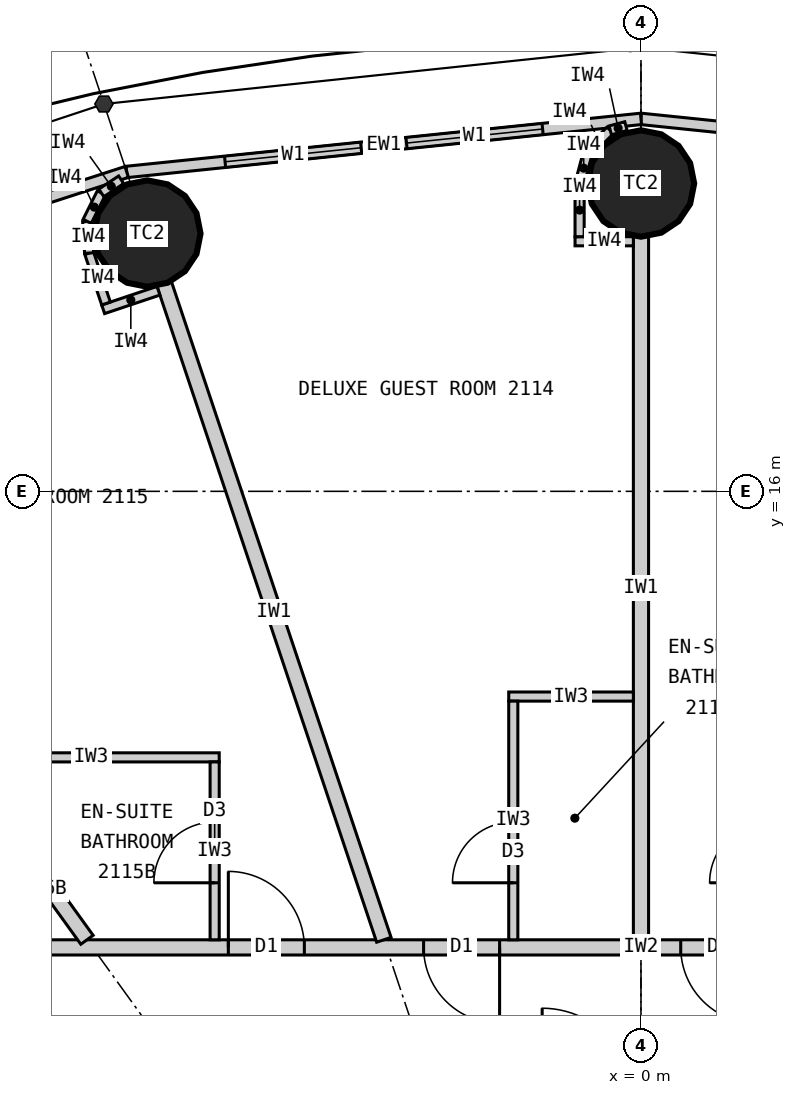
"""IFC4 building model, lengths in metres.
Left out: names, types, materials, properties, quantities, classifications, styles, units other than length and angle.
Written with IfcOpenShell. Run it as: python <this file> out.ifc"""

import sys

from ifc_helpers import new_model, si_unit, direction, frame, frame_2d, origin, origin_2d, place, context, subcontext, project, spatial, rectangle, circle, extrude, element, fill, save


model = new_model("IFC4")
c1 = context("Model", 3, precision=1e-05, world=origin(), true_north=direction((0.0, 1.0)))
c2 = subcontext(c1, "Body", "Model", "MODEL_VIEW")
j1 = project(units=[si_unit("LENGTHUNIT", "METRE"), si_unit("PLANEANGLEUNIT", "RADIAN")], contexts=[c1])
p1 = place(None, origin())
s1 = spatial("IfcSite", under=j1, at=p1, CompositionType="ELEMENT")
p2 = place(p1, origin())
s2 = spatial("IfcBuilding", under=s1, at=p2, CompositionType="ELEMENT")
p3 = place(p2, frame((0.0, 0.0, 83.7)))
s3 = spatial("IfcBuildingStorey", under=s2, at=p3, CompositionType="ELEMENT", Elevation=83.7)
for number, where, z_axis, x_axis in (
    (1, (0.0, 20.05, 0.0), (0.0, 0.0, 1.0), (1.0, 0.0, 0.0)),
    (2, (-6.495, 19.391, 0.0), (0.0, 0.0, 1.0), (1.0, 0.0, 0.0)),
):
    element("IfcColumn", number, at=place(p3, frame(where, z_axis=z_axis, x_axis=x_axis)), inside=s3, PredefinedType="COLUMN", context=c2, shape_type="SweptSolid", body=[
        extrude(circle(Radius=0.7, at=origin_2d()), origin(), (0.0, 0.0, 1.0), 3.3),
    ])
p4 = place(p3, frame((6.766, 20.202, 0.0), z_axis=(0.0, 0.0, 1.0), x_axis=(-0.994721394369, 0.102612609291, 0.0)))
e3 = element("IfcWall", 3, at=p4, inside=s3, PredefinedType="ELEMENTEDWALL", context=c2, shape_type="SweptSolid", body=[
    extrude(rectangle(XDim=6.802, YDim=0.15, at=frame_2d((3.401, 0.0))), origin(), (0.0, 0.0, 1.0), 3.12),
])
p5 = place(p4, frame((1.301, 0.0, 0.9)))
e4 = element("IfcOpeningElement", 4, at=p5, cuts=e3, PredefinedType="OPENING", context=c2, shape_type="SweptSolid", body=[
    extrude(rectangle(XDim=1.8, YDim=1.9, at=frame_2d((0.9, 0.95))), frame((0.0, 0.085, 0.0), z_axis=(0.0, -1.0, 0.0), x_axis=(1.0, 0.0, 0.0)), (0.0, 0.0, 1.0), 0.17),
])
p6 = place(p4, frame((3.701, 0.0, 0.9)))
e5 = element("IfcOpeningElement", 5, at=p6, cuts=e3, PredefinedType="OPENING", context=c2, shape_type="SweptSolid", body=[
    extrude(rectangle(XDim=1.8, YDim=1.9, at=frame_2d((0.9, 0.95))), frame((0.0, 0.085, 0.0), z_axis=(0.0, -1.0, 0.0), x_axis=(1.0, 0.0, 0.0)), (0.0, 0.0, 1.0), 0.17),
])
p7 = place(p3, frame((0.0, 20.9, 0.0), z_axis=(0.0, 0.0, 1.0), x_axis=(-0.994721394369, -0.102612609291, 0.0)))
e6 = element("IfcWall", 6, at=p7, inside=s3, PredefinedType="ELEMENTEDWALL", context=c2, shape_type="SweptSolid", body=[
    extrude(rectangle(XDim=6.802, YDim=0.15, at=frame_2d((3.401, 0.0))), origin(), (0.0, 0.0, 1.0), 3.12),
])
p8 = place(p7, frame((1.301, 0.0, 0.9)))
e7 = element("IfcOpeningElement", 7, at=p8, cuts=e6, PredefinedType="OPENING", context=c2, shape_type="SweptSolid", body=[
    extrude(rectangle(XDim=1.8, YDim=1.9, at=frame_2d((0.9, 0.95))), frame((0.0, 0.085, 0.0), z_axis=(0.0, -1.0, 0.0), x_axis=(1.0, 0.0, 0.0)), (0.0, 0.0, 1.0), 0.17),
])
p9 = place(p7, frame((3.701, 0.0, 0.9)))
e8 = element("IfcOpeningElement", 8, at=p9, cuts=e6, PredefinedType="OPENING", context=c2, shape_type="SweptSolid", body=[
    extrude(rectangle(XDim=1.8, YDim=1.9, at=frame_2d((0.9, 0.95))), frame((0.0, 0.085, 0.0), z_axis=(0.0, -1.0, 0.0), x_axis=(1.0, 0.0, 0.0)), (0.0, 0.0, 1.0), 0.17),
])
p10 = place(p3, frame((-6.766, 20.202, 0.0), z_axis=(0.0, 0.0, 1.0), x_axis=(-0.951137534625, -0.308767534285, 0.0)))
e9 = element("IfcWall", 9, at=p10, inside=s3, PredefinedType="ELEMENTEDWALL", context=c2, shape_type="SweptSolid", body=[
    extrude(rectangle(XDim=6.655, YDim=0.15, at=frame_2d((3.328, 0.0))), origin(), (0.0, 0.0, 1.0), 3.12),
])
p11 = place(p10, frame((1.228, 0.0, 0.9)))
e10 = element("IfcOpeningElement", 10, at=p11, cuts=e9, PredefinedType="OPENING", context=c2, shape_type="SweptSolid", body=[
    extrude(rectangle(XDim=1.8, YDim=1.9, at=frame_2d((0.9, 0.95))), frame((0.0, 0.085, 0.0), z_axis=(0.0, -1.0, 0.0), x_axis=(1.0, 0.0, 0.0)), (0.0, 0.0, 1.0), 0.17),
])
p12 = place(p10, frame((3.628, 0.0, 0.9)))
e11 = element("IfcOpeningElement", 11, at=p12, cuts=e9, PredefinedType="OPENING", context=c2, shape_type="SweptSolid", body=[
    extrude(rectangle(XDim=1.8, YDim=1.9, at=frame_2d((0.9, 0.95))), frame((0.0, 0.085, 0.0), z_axis=(0.0, -1.0, 0.0), x_axis=(1.0, 0.0, 0.0)), (0.0, 0.0, 1.0), 0.17),
])
p13 = place(p3, frame((-14.1, 10.0, 0.0), z_axis=(0.0, 0.0, 1.0), x_axis=(1.0, 0.0, 0.0)))
e12 = element("IfcWall", 12, at=p13, inside=s3, PredefinedType="PARTITIONING", context=c2, shape_type="SweptSolid", body=[
    extrude(rectangle(XDim=28.2, YDim=0.2, at=frame_2d((14.1, 0.0))), origin(), (0.0, 0.0, 1.0), 3.12),
])
p14 = place(p13, frame((23.865, 0.0, 0.0)))
e13 = element("IfcOpeningElement", 13, at=p14, cuts=e12, PredefinedType="OPENING", context=c2, shape_type="SweptSolid", body=[
    extrude(rectangle(XDim=1.0, YDim=2.2, at=frame_2d((0.5, 1.1))), frame((0.0, 0.11, 0.0), z_axis=(0.0, -1.0, 0.0), x_axis=(1.0, 0.0, 0.0)), (0.0, 0.0, 1.0), 0.22),
])
p15 = place(p13, frame((18.529, 0.0, 0.0)))
e14 = element("IfcOpeningElement", 14, at=p15, cuts=e12, PredefinedType="OPENING", context=c2, shape_type="SweptSolid", body=[
    extrude(rectangle(XDim=1.0, YDim=2.2, at=frame_2d((0.5, 1.1))), frame((0.0, 0.11, 0.0), z_axis=(0.0, -1.0, 0.0), x_axis=(1.0, 0.0, 0.0)), (0.0, 0.0, 1.0), 0.22),
])
p16 = place(p13, frame((14.623, 0.0, 0.0)))
e15 = element("IfcOpeningElement", 15, at=p16, cuts=e12, PredefinedType="OPENING", context=c2, shape_type="SweptSolid", body=[
    extrude(rectangle(XDim=1.0, YDim=2.2, at=frame_2d((0.5, 1.1))), frame((0.0, 0.11, 0.0), z_axis=(0.0, -1.0, 0.0), x_axis=(1.0, 0.0, 0.0)), (0.0, 0.0, 1.0), 0.22),
])
p17 = place(p13, frame((11.24, 0.0, 0.0)))
e16 = element("IfcOpeningElement", 16, at=p17, cuts=e12, PredefinedType="OPENING", context=c2, shape_type="SweptSolid", body=[
    extrude(rectangle(XDim=1.0, YDim=2.2, at=frame_2d((0.5, 1.1))), frame((0.0, 0.11, 0.0), z_axis=(0.0, -1.0, 0.0), x_axis=(1.0, 0.0, 0.0)), (0.0, 0.0, 1.0), 0.22),
])
p18 = place(p13, frame((8.671, 0.0, 0.0)))
e17 = element("IfcOpeningElement", 17, at=p18, cuts=e12, PredefinedType="OPENING", context=c2, shape_type="SweptSolid", body=[
    extrude(rectangle(XDim=1.0, YDim=2.2, at=frame_2d((0.5, 1.1))), frame((0.0, 0.11, 0.0), z_axis=(0.0, -1.0, 0.0), x_axis=(1.0, 0.0, 0.0)), (0.0, 0.0, 1.0), 0.22),
])
p19 = place(p13, frame((2.801, 0.0, 0.0)))
e18 = element("IfcOpeningElement", 18, at=p19, cuts=e12, PredefinedType="OPENING", context=c2, shape_type="SweptSolid", body=[
    extrude(rectangle(XDim=1.0, YDim=2.2, at=frame_2d((0.5, 1.1))), frame((0.0, 0.11, 0.0), z_axis=(0.0, -1.0, 0.0), x_axis=(1.0, 0.0, 0.0)), (0.0, 0.0, 1.0), 0.22),
])
p20 = place(p3, frame((0.0, 10.1, 0.0), z_axis=(0.0, 0.0, 1.0), x_axis=(0.0, 1.0, 0.0)))
e19 = element("IfcWall", 19, at=p20, inside=s3, PredefinedType="PARTITIONING", context=c2, shape_type="SweptSolid", body=[
    extrude(rectangle(XDim=9.25, YDim=0.2, at=frame_2d((4.625, 0.0))), origin(), (0.0, 0.0, 1.0), 2.32),
])
p21 = place(p3, frame((-3.383, 10.1, 0.0), z_axis=(0.0, 0.0, 1.0), x_axis=(-0.31759592231, 0.948226149256, 0.0)))
e20 = element("IfcWall", 20, at=p21, inside=s3, PredefinedType="PARTITIONING", context=c2, shape_type="SweptSolid", body=[
    extrude(rectangle(XDim=9.098, YDim=0.2, at=frame_2d((4.549, 0.0))), origin(), (0.0, 0.0, 1.0), 2.32),
])
p22 = place(p3, frame((-7.289, 10.1, 0.0), z_axis=(0.0, 0.0, 1.0), x_axis=(-0.585198353053, 0.810890182197, 0.0)))
e21 = element("IfcWall", 21, at=p22, inside=s3, PredefinedType="PARTITIONING", context=c2, shape_type="SweptSolid", body=[
    extrude(rectangle(XDim=8.36, YDim=0.2, at=frame_2d((4.18, 0.0))), origin(), (0.0, 0.0, 1.0), 2.32),
])
p23 = place(p3, frame((-0.1, 13.3, 0.0), z_axis=(0.0, 0.0, 1.0), x_axis=(-1.0, 0.0, 0.0)))
e22 = element("IfcWall", 22, at=p23, inside=s3, PredefinedType="PARTITIONING", context=c2, shape_type="SweptSolid", body=[
    extrude(rectangle(XDim=1.64, YDim=0.12, at=frame_2d((0.82, 0.0))), origin(), (0.0, 0.0, 1.0), 3.12),
])
p24 = place(p3, frame((-1.68, 10.1, 0.0), z_axis=(0.0, 0.0, 1.0), x_axis=(0.0, 1.0, 0.0)))
e23 = element("IfcWall", 23, at=p24, inside=s3, PredefinedType="PARTITIONING", context=c2, shape_type="SweptSolid", body=[
    extrude(rectangle(XDim=3.14, YDim=0.12, at=frame_2d((1.57, 0.0))), origin(), (0.0, 0.0, 1.0), 3.12),
])
p25 = place(p24, frame((0.75, 0.0, 0.0)))
e24 = element("IfcOpeningElement", 24, at=p25, cuts=e23, PredefinedType="OPENING", context=c2, shape_type="SweptSolid", body=[
    extrude(rectangle(XDim=0.8, YDim=2.1, at=frame_2d((0.4, 1.05))), frame((0.0, 0.07, 0.0), z_axis=(0.0, -1.0, 0.0), x_axis=(1.0, 0.0, 0.0)), (0.0, 0.0, 1.0), 0.14),
])
p26 = place(p3, frame((-8.921, 12.5, 0.0), z_axis=(0.0, 0.0, 1.0), x_axis=(1.0, 0.0, 0.0)))
e25 = element("IfcWall", 25, at=p26, inside=s3, PredefinedType="PARTITIONING", context=c2, shape_type="SweptSolid", body=[
    extrude(rectangle(XDim=3.372, YDim=0.12, at=frame_2d((1.686, 0.0))), origin(), (0.0, 0.0, 1.0), 3.12),
])
p27 = place(p3, frame((-5.609, 10.1, 0.0), z_axis=(0.0, 0.0, 1.0), x_axis=(0.0, 1.0, 0.0)))
e26 = element("IfcWall", 26, at=p27, inside=s3, PredefinedType="PARTITIONING", context=c2, shape_type="SweptSolid", body=[
    extrude(rectangle(XDim=2.34, YDim=0.12, at=frame_2d((1.17, 0.0))), origin(), (0.0, 0.0, 1.0), 3.12),
])
p28 = place(p27, frame((0.75, 0.0, 0.0)))
e27 = element("IfcOpeningElement", 27, at=p28, cuts=e26, PredefinedType="OPENING", context=c2, shape_type="SweptSolid", body=[
    extrude(rectangle(XDim=0.8, YDim=2.1, at=frame_2d((0.4, 1.05))), frame((0.0, 0.07, 0.0), z_axis=(0.0, -1.0, 0.0), x_axis=(1.0, 0.0, 0.0)), (0.0, 0.0, 1.0), 0.14),
])
p29 = place(p3, frame((-0.1, 19.29, 0.0), z_axis=(0.0, 0.0, 1.0), x_axis=(-1.0, 0.0, 0.0)))
e28 = element("IfcWall", 28, at=p29, inside=s3, PredefinedType="PARTITIONING", context=c2, shape_type="SweptSolid", body=[
    extrude(rectangle(XDim=0.767, YDim=0.12, at=frame_2d((0.384, 0.0))), origin(), (0.0, 0.0, 1.0), 3.12),
])
p30 = place(p3, frame((-0.808, 19.35, 0.0), z_axis=(0.0, 0.0, 1.0), x_axis=(0.0, 1.0, 0.0)))
e29 = element("IfcWall", 29, at=p30, inside=s3, PredefinedType="PARTITIONING", context=c2, shape_type="SweptSolid", body=[
    extrude(rectangle(XDim=0.7, YDim=0.12, at=frame_2d((0.35, 0.0))), origin(), (0.0, 0.0, 1.0), 3.12),
])
p31 = place(p3, frame((-0.808, 20.05, 0.0), z_axis=(0.0, 0.0, 1.0), x_axis=(0.2592614205, 0.965807183573, 0.0)))
e30 = element("IfcWall", 30, at=p31, inside=s3, PredefinedType="PARTITIONING", context=c2, shape_type="SweptSolid", body=[
    extrude(rectangle(XDim=0.418, YDim=0.12, at=frame_2d((0.209, 0.0))), origin(), (0.0, 0.0, 1.0), 3.12),
])
p32 = place(p3, frame((-0.699, 20.454, 0.0), z_axis=(0.0, 0.0, 1.0), x_axis=(0.707106781187, 0.707106781187, 0.0)))
e31 = element("IfcWall", 31, at=p32, inside=s3, PredefinedType="PARTITIONING", context=c2, shape_type="SweptSolid", body=[
    extrude(rectangle(XDim=0.418, YDim=0.12, at=frame_2d((0.209, 0.0))), origin(), (0.0, 0.0, 1.0), 3.12),
])
p33 = place(p3, frame((-0.404, 20.749, 0.0), z_axis=(0.0, 0.0, 1.0), x_axis=(0.965759066438, 0.25944060128, 0.0)))
e32 = element("IfcWall", 32, at=p33, inside=s3, PredefinedType="PARTITIONING", context=c2, shape_type="SweptSolid", body=[
    extrude(rectangle(XDim=0.214, YDim=0.12, at=frame_2d((0.107, 0.0))), origin(), (0.0, 0.0, 1.0), 3.12),
])
p34 = place(p3, frame((-6.348, 18.639, 0.0), z_axis=(0.0, 0.0, 1.0), x_axis=(-0.948268951266, -0.317468102437, 0.0)))
e33 = element("IfcWall", 33, at=p34, inside=s3, PredefinedType="PARTITIONING", context=c2, shape_type="SweptSolid", body=[
    extrude(rectangle(XDim=0.768, YDim=0.12, at=frame_2d((0.384, 0.0))), origin(), (0.0, 0.0, 1.0), 3.12),
])
p35 = place(p3, frame((-7.038, 18.471, 0.0), z_axis=(0.0, 0.0, 1.0), x_axis=(-0.317378466199, 0.9482989556, 0.0)))
e34 = element("IfcWall", 34, at=p35, inside=s3, PredefinedType="PARTITIONING", context=c2, shape_type="SweptSolid", body=[
    extrude(rectangle(XDim=0.7, YDim=0.12, at=frame_2d((0.35, 0.0))), origin(), (0.0, 0.0, 1.0), 3.12),
])
p36 = place(p3, frame((-7.26, 19.135, 0.0), z_axis=(0.0, 0.0, 1.0), x_axis=(-0.0613238046, 0.99811792439, 0.0)))
e35 = element("IfcWall", 35, at=p36, inside=s3, PredefinedType="PARTITIONING", context=c2, shape_type="SweptSolid", body=[
    extrude(rectangle(XDim=0.418, YDim=0.12, at=frame_2d((0.209, 0.0))), origin(), (0.0, 0.0, 1.0), 3.12),
])
p37 = place(p3, frame((-7.286, 19.552, 0.0), z_axis=(0.0, 0.0, 1.0), x_axis=(0.445810757773, 0.89512723579, 0.0)))
e36 = element("IfcWall", 36, at=p37, inside=s3, PredefinedType="PARTITIONING", context=c2, shape_type="SweptSolid", body=[
    extrude(rectangle(XDim=0.418, YDim=0.12, at=frame_2d((0.209, 0.0))), origin(), (0.0, 0.0, 1.0), 3.12),
])
p38 = place(p3, frame((-7.1, 19.926, 0.0), z_axis=(0.0, 0.0, 1.0), x_axis=(0.833488262509, 0.552537162787, 0.0)))
e37 = element("IfcWall", 37, at=p38, inside=s3, PredefinedType="PARTITIONING", context=c2, shape_type="SweptSolid", body=[
    extrude(rectangle(XDim=0.313, YDim=0.12, at=frame_2d((0.156, 0.0))), origin(), (0.0, 0.0, 1.0), 3.12),
])
p39 = place(p8, origin())
e38 = element("IfcWindow", 38, at=p39, inside=s3, PartitioningType="SINGLE_PANEL", PredefinedType="WINDOW", context=c2, shape_type="SweptSolid", body=[
    extrude(rectangle(XDim=1.8, YDim=1.9, at=frame_2d((0.9, 0.95))), frame((0.0, 0.03, 0.0), z_axis=(0.0, -1.0, 0.0), x_axis=(1.0, 0.0, 0.0)), (0.0, 0.0, 1.0), 0.06),
])
fill(e7, e38)
p40 = place(p9, origin())
e39 = element("IfcWindow", 39, at=p40, inside=s3, PartitioningType="SINGLE_PANEL", PredefinedType="WINDOW", context=c2, shape_type="SweptSolid", body=[
    extrude(rectangle(XDim=1.8, YDim=1.9, at=frame_2d((0.9, 0.95))), frame((0.0, 0.03, 0.0), z_axis=(0.0, -1.0, 0.0), x_axis=(1.0, 0.0, 0.0)), (0.0, 0.0, 1.0), 0.06),
])
fill(e8, e39)
p41 = place(p16, origin())
e40 = element("IfcDoor", 40, at=p41, inside=s3, OperationType="SINGLE_SWING_RIGHT", PredefinedType="DOOR", context=c2, shape_type="SweptSolid", body=[
    extrude(rectangle(XDim=1.0, YDim=2.2, at=frame_2d((0.5, 1.1))), frame((0.0, 0.025, 0.0), z_axis=(0.0, -1.0, 0.0), x_axis=(1.0, 0.0, 0.0)), (0.0, 0.0, 1.0), 0.05),
])
fill(e15, e40)
p42 = place(p25, origin())
e41 = element("IfcDoor", 41, at=p42, inside=s3, OperationType="SINGLE_SWING_LEFT", PredefinedType="DOOR", context=c2, shape_type="SweptSolid", body=[
    extrude(rectangle(XDim=0.8, YDim=2.1, at=frame_2d((0.4, 1.05))), frame((0.0, 0.025, 0.0), z_axis=(0.0, -1.0, 0.0), x_axis=(1.0, 0.0, 0.0)), (0.0, 0.0, 1.0), 0.05),
])
fill(e24, e41)
p43 = place(p17, origin())
e42 = element("IfcDoor", 42, at=p43, inside=s3, OperationType="SINGLE_SWING_RIGHT", PredefinedType="DOOR", context=c2, shape_type="SweptSolid", body=[
    extrude(rectangle(XDim=1.0, YDim=2.2, at=frame_2d((0.5, 1.1))), frame((0.0, 0.025, 0.0), z_axis=(0.0, -1.0, 0.0), x_axis=(1.0, 0.0, 0.0)), (0.0, 0.0, 1.0), 0.05),
])
fill(e16, e42)
p44 = place(p28, origin())
e43 = element("IfcDoor", 43, at=p44, inside=s3, OperationType="SINGLE_SWING_LEFT", PredefinedType="DOOR", context=c2, shape_type="SweptSolid", body=[
    extrude(rectangle(XDim=0.8, YDim=2.1, at=frame_2d((0.4, 1.05))), frame((0.0, 0.025, 0.0), z_axis=(0.0, -1.0, 0.0), x_axis=(1.0, 0.0, 0.0)), (0.0, 0.0, 1.0), 0.05),
])
fill(e27, e43)
p45 = place(p18, origin())
e44 = element("IfcDoor", 44, at=p45, inside=s3, OperationType="SINGLE_SWING_LEFT", PredefinedType="DOOR", context=c2, shape_type="SweptSolid", body=[
    extrude(rectangle(XDim=1.0, YDim=2.2, at=frame_2d((0.5, 1.1))), frame((0.0, 0.025, 0.0), z_axis=(0.0, -1.0, 0.0), x_axis=(1.0, 0.0, 0.0)), (0.0, 0.0, 1.0), 0.05),
])
fill(e17, e44)
save(model, sys.argv[1])
